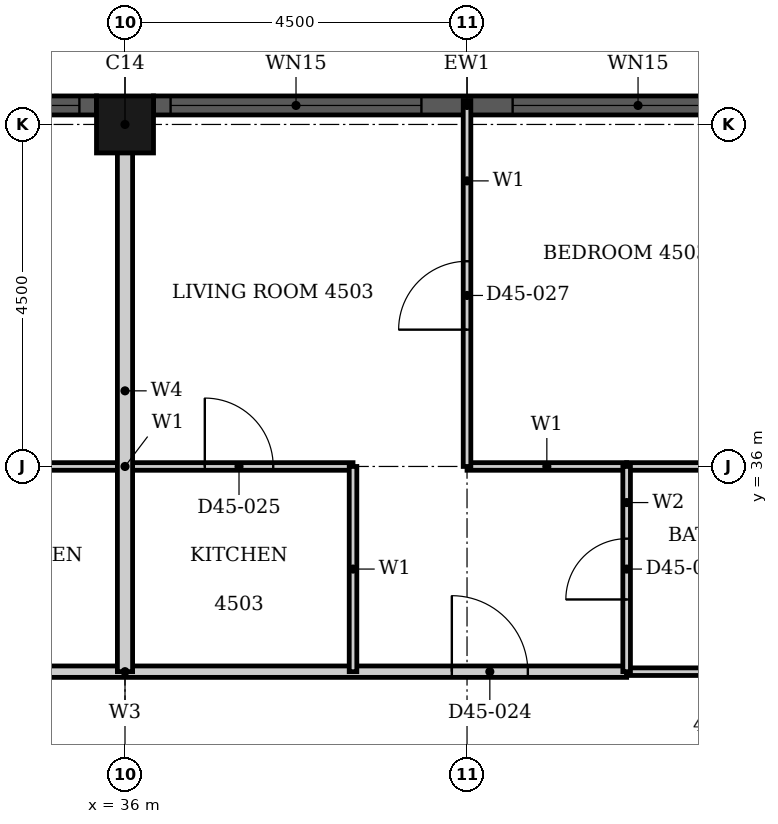
"""IFC4 building model, lengths in metres.
Left out: names, types, materials, properties, quantities, classifications, styles, units other than length and angle.
Written with IfcOpenShell. Run it as: python <this file> out.ifc"""

import sys

from ifc_helpers import new_model, si_unit, direction, frame, frame_2d, origin, origin_2d, place, context, subcontext, project, spatial, rectangle, hollow_rectangle, extrude, element, fill, save


model = new_model("IFC4")
c1 = context("Model", 3, precision=1e-05, world=origin(), true_north=direction((0.0, 1.0)))
c2 = subcontext(c1, "Body", "Model", "MODEL_VIEW")
j1 = project(units=[si_unit("LENGTHUNIT", "METRE"), si_unit("PLANEANGLEUNIT", "RADIAN")], contexts=[c1])
p1 = place(None, origin())
s1 = spatial("IfcSite", under=j1, at=p1, CompositionType="ELEMENT")
p2 = place(p1, origin())
s2 = spatial("IfcBuilding", under=s1, at=p2, CompositionType="ELEMENT")
p3 = place(p2, frame((0.0, 0.0, 180.2)))
s3 = spatial("IfcBuildingStorey", under=s2, at=p3, CompositionType="ELEMENT", Elevation=180.2)
p4 = place(p3, frame((36.0, 40.5, 0.0), z_axis=(0.0, 0.0, 1.0), x_axis=(1.0, 0.0, 0.0)))
e1 = element("IfcColumn", 1, at=p4, inside=s3, PredefinedType="COLUMN", context=c2, shape_type="SweptSolid", body=[
    extrude(hollow_rectangle(XDim=0.75, YDim=0.75, WallThickness=0.024, at=origin_2d()), origin(), (0.0, 0.0, 1.0), 3.7),
])
p5 = place(p3, frame((44.625, 40.75, 0.0), z_axis=(0.0, 0.0, 1.0), x_axis=(-1.0, 0.0, 0.0)))
e2 = element("IfcWall", 2, at=p5, inside=s3, PredefinedType="SOLIDWALL", context=c2, shape_type="SweptSolid", body=[
    extrude(rectangle(XDim=8.25, YDim=0.25, at=frame_2d((4.125, 0.0))), origin(), (0.0, 0.0, 1.0), 3.7),
])
p6 = place(p5, frame((0.225, 0.0, 0.45)))
e3 = element("IfcOpeningElement", 3, at=p6, cuts=e2, PredefinedType="OPENING", context=c2, shape_type="SweptSolid", body=[
    extrude(rectangle(XDim=3.3, YDim=2.3, at=frame_2d((1.65, 1.15))), frame((0.0, 0.135, 0.0), z_axis=(0.0, -1.0, 0.0), x_axis=(1.0, 0.0, 0.0)), (0.0, 0.0, 1.0), 0.27),
])
p7 = place(p5, frame((4.725, 0.0, 0.45)))
e4 = element("IfcOpeningElement", 4, at=p7, cuts=e2, PredefinedType="OPENING", context=c2, shape_type="SweptSolid", body=[
    extrude(rectangle(XDim=3.3, YDim=2.3, at=frame_2d((1.65, 1.15))), frame((0.0, 0.135, 0.0), z_axis=(0.0, -1.0, 0.0), x_axis=(1.0, 0.0, 0.0)), (0.0, 0.0, 1.0), 0.27),
])
p8 = place(p3, frame((35.625, 40.75, 0.0), z_axis=(0.0, 0.0, 1.0), x_axis=(-1.0, 0.0, 0.0)))
e5 = element("IfcWall", 5, at=p8, inside=s3, PredefinedType="SOLIDWALL", context=c2, shape_type="SweptSolid", body=[
    extrude(rectangle(XDim=8.25, YDim=0.25, at=frame_2d((4.125, 0.0))), origin(), (0.0, 0.0, 1.0), 3.7),
])
p9 = place(p8, frame((0.225, 0.0, 0.45)))
e6 = element("IfcOpeningElement", 6, at=p9, cuts=e5, PredefinedType="OPENING", context=c2, shape_type="SweptSolid", body=[
    extrude(rectangle(XDim=3.3, YDim=2.3, at=frame_2d((1.65, 1.15))), frame((0.0, 0.135, 0.0), z_axis=(0.0, -1.0, 0.0), x_axis=(1.0, 0.0, 0.0)), (0.0, 0.0, 1.0), 0.27),
])
p10 = place(p8, frame((4.725, 0.0, 0.45)))
e7 = element("IfcOpeningElement", 7, at=p10, cuts=e5, PredefinedType="OPENING", context=c2, shape_type="SweptSolid", body=[
    extrude(rectangle(XDim=3.3, YDim=2.3, at=frame_2d((1.65, 1.15))), frame((0.0, 0.135, 0.0), z_axis=(0.0, -1.0, 0.0), x_axis=(1.0, 0.0, 0.0)), (0.0, 0.0, 1.0), 0.27),
])
p11 = place(p3, frame((29.4, 33.3, 0.0), z_axis=(0.0, 0.0, 1.0), x_axis=(1.0, 0.0, 0.0)))
e8 = element("IfcWall", 8, at=p11, inside=s3, PredefinedType="PARTITIONING", context=c2, shape_type="SweptSolid", body=[
    extrude(rectangle(XDim=13.2, YDim=0.15, at=frame_2d((6.6, 0.0))), origin(), (0.0, 0.0, 1.0), 3.4),
])
p12 = place(p11, frame((1.3, 0.0, 0.0)))
e9 = element("IfcOpeningElement", 9, at=p12, cuts=e8, PredefinedType="OPENING", context=c2, shape_type="SweptSolid", body=[
    extrude(rectangle(XDim=1.0, YDim=2.2, at=frame_2d((0.5, 1.1))), frame((0.0, 0.085, 0.0), z_axis=(0.0, -1.0, 0.0), x_axis=(1.0, 0.0, 0.0)), (0.0, 0.0, 1.0), 0.17),
])
p13 = place(p11, frame((10.9, 0.0, 0.0)))
e10 = element("IfcOpeningElement", 10, at=p13, cuts=e8, PredefinedType="OPENING", context=c2, shape_type="SweptSolid", body=[
    extrude(rectangle(XDim=1.0, YDim=2.2, at=frame_2d((0.5, 1.1))), frame((0.0, 0.085, 0.0), z_axis=(0.0, -1.0, 0.0), x_axis=(1.0, 0.0, 0.0)), (0.0, 0.0, 1.0), 0.17),
])
p14 = place(p3, frame((33.0, 36.0, 0.0), z_axis=(0.0, 0.0, 1.0), x_axis=(1.0, 0.0, 0.0)))
e11 = element("IfcWall", 11, at=p14, inside=s3, PredefinedType="PARTITIONING", context=c2, shape_type="SweptSolid", body=[
    extrude(rectangle(XDim=6.0, YDim=0.1, at=frame_2d((3.0, 0.0))), origin(), (0.0, 0.0, 1.0), 3.4),
])
p15 = place(p14, frame((1.05, 0.0, 0.0)))
e12 = element("IfcOpeningElement", 12, at=p15, cuts=e11, PredefinedType="OPENING", context=c2, shape_type="SweptSolid", body=[
    extrude(rectangle(XDim=0.9, YDim=2.1, at=frame_2d((0.45, 1.05))), frame((0.0, 0.06, 0.0), z_axis=(0.0, -1.0, 0.0), x_axis=(1.0, 0.0, 0.0)), (0.0, 0.0, 1.0), 0.12),
])
p16 = place(p14, frame((4.05, 0.0, 0.0)))
e13 = element("IfcOpeningElement", 13, at=p16, cuts=e11, PredefinedType="OPENING", context=c2, shape_type="SweptSolid", body=[
    extrude(rectangle(XDim=0.9, YDim=2.1, at=frame_2d((0.45, 1.05))), frame((0.0, 0.06, 0.0), z_axis=(0.0, -1.0, 0.0), x_axis=(1.0, 0.0, 0.0)), (0.0, 0.0, 1.0), 0.12),
])
p17 = place(p3, frame((40.5, 36.0, 0.0), z_axis=(0.0, 0.0, 1.0), x_axis=(1.0, 0.0, 0.0)))
e14 = element("IfcWall", 14, at=p17, inside=s3, PredefinedType="PARTITIONING", context=c2, shape_type="SweptSolid", body=[
    extrude(rectangle(XDim=2.1, YDim=0.1, at=frame_2d((1.05, 0.0))), origin(), (0.0, 0.0, 1.0), 3.4),
])
p18 = place(p3, frame((39.0, 33.3, 0.0), z_axis=(0.0, 0.0, 1.0), x_axis=(0.0, 1.0, 0.0)))
e15 = element("IfcWall", 15, at=p18, inside=s3, PredefinedType="PARTITIONING", context=c2, shape_type="SweptSolid", body=[
    extrude(rectangle(XDim=2.7, YDim=0.1, at=frame_2d((1.35, 0.0))), origin(), (0.0, 0.0, 1.0), 3.4),
])
p19 = place(p3, frame((40.5, 36.0, 0.0), z_axis=(0.0, 0.0, 1.0), x_axis=(0.0, 1.0, 0.0)))
e16 = element("IfcWall", 16, at=p19, inside=s3, PredefinedType="PARTITIONING", context=c2, shape_type="SweptSolid", body=[
    extrude(rectangle(XDim=4.815, YDim=0.1, at=frame_2d((2.407, 0.0))), origin(), (0.0, 0.0, 1.0), 3.4),
])
p20 = place(p19, frame((1.8, 0.0, 0.0)))
e17 = element("IfcOpeningElement", 17, at=p20, cuts=e16, PredefinedType="OPENING", context=c2, shape_type="SweptSolid", body=[
    extrude(rectangle(XDim=0.9, YDim=2.1, at=frame_2d((0.45, 1.05))), frame((0.0, 0.06, 0.0), z_axis=(0.0, -1.0, 0.0), x_axis=(1.0, 0.0, 0.0)), (0.0, 0.0, 1.0), 0.12),
])
p21 = place(p3, frame((36.0, 33.3, 0.0), z_axis=(0.0, 0.0, 1.0), x_axis=(0.0, 1.0, 0.0)))
e18 = element("IfcWall", 18, at=p21, inside=s3, PredefinedType="PARTITIONING", context=c2, shape_type="SweptSolid", body=[
    extrude(rectangle(XDim=7.39, YDim=0.2, at=frame_2d((3.695, 0.0))), origin(), (0.0, 0.0, 1.0), 3.4),
])
for number, where, z_axis, x_axis in (
    (19, (42.6, 33.3, 0.0), (0.0, 0.0, 1.0), (1.0, 0.0, 0.0)),
    (20, (42.6, 36.0, 0.0), (0.0, 0.0, 1.0), (1.0, 0.0, 0.0)),
):
    element("IfcWall", number, at=place(p3, frame(where, z_axis=z_axis, x_axis=x_axis)), inside=s3, PredefinedType="PARTITIONING", context=c2, shape_type="SweptSolid", body=[
        extrude(rectangle(XDim=2.4, YDim=0.1, at=frame_2d((1.2, 0.0))), origin(), (0.0, 0.0, 1.0), 3.4),
    ])
p22 = place(p3, frame((42.6, 33.3, 0.0), z_axis=(0.0, 0.0, 1.0), x_axis=(0.0, 1.0, 0.0)))
e21 = element("IfcWall", 21, at=p22, inside=s3, PredefinedType="PARTITIONING", context=c2, shape_type="SweptSolid", body=[
    extrude(rectangle(XDim=2.7, YDim=0.1, at=frame_2d((1.35, 0.0))), origin(), (0.0, 0.0, 1.0), 3.4),
])
p23 = place(p22, frame((0.95, 0.0, 0.0)))
e22 = element("IfcOpeningElement", 22, at=p23, cuts=e21, PredefinedType="OPENING", context=c2, shape_type="SweptSolid", body=[
    extrude(rectangle(XDim=0.8, YDim=2.1, at=frame_2d((0.4, 1.05))), frame((0.0, 0.06, 0.0), z_axis=(0.0, -1.0, 0.0), x_axis=(1.0, 0.0, 0.0)), (0.0, 0.0, 1.0), 0.12),
])
p24 = place(p6, origin())
e23 = element("IfcWindow", 23, at=p24, inside=s3, PartitioningType="SINGLE_PANEL", PredefinedType="WINDOW", context=c2, shape_type="SweptSolid", body=[
    extrude(rectangle(XDim=3.3, YDim=2.3, at=frame_2d((1.65, 1.15))), frame((0.0, 0.03, 0.0), z_axis=(0.0, -1.0, 0.0), x_axis=(1.0, 0.0, 0.0)), (0.0, 0.0, 1.0), 0.06),
])
fill(e3, e23)
p25 = place(p7, origin())
e24 = element("IfcWindow", 24, at=p25, inside=s3, PartitioningType="SINGLE_PANEL", PredefinedType="WINDOW", context=c2, shape_type="SweptSolid", body=[
    extrude(rectangle(XDim=3.3, YDim=2.3, at=frame_2d((1.65, 1.15))), frame((0.0, 0.03, 0.0), z_axis=(0.0, -1.0, 0.0), x_axis=(1.0, 0.0, 0.0)), (0.0, 0.0, 1.0), 0.06),
])
fill(e4, e24)
p26 = place(p9, origin())
e25 = element("IfcWindow", 25, at=p26, inside=s3, PartitioningType="SINGLE_PANEL", PredefinedType="WINDOW", context=c2, shape_type="SweptSolid", body=[
    extrude(rectangle(XDim=3.3, YDim=2.3, at=frame_2d((1.65, 1.15))), frame((0.0, 0.03, 0.0), z_axis=(0.0, -1.0, 0.0), x_axis=(1.0, 0.0, 0.0)), (0.0, 0.0, 1.0), 0.06),
])
fill(e6, e25)
p27 = place(p13, origin())
e26 = element("IfcDoor", 26, at=p27, inside=s3, OperationType="SINGLE_SWING_LEFT", PredefinedType="DOOR", context=c2, shape_type="SweptSolid", body=[
    extrude(rectangle(XDim=1.0, YDim=2.2, at=frame_2d((0.5, 1.1))), frame((0.0, 0.025, 0.0), z_axis=(0.0, -1.0, 0.0), x_axis=(1.0, 0.0, 0.0)), (0.0, 0.0, 1.0), 0.05),
])
fill(e10, e26)
p28 = place(p16, origin())
e27 = element("IfcDoor", 27, at=p28, inside=s3, OperationType="SINGLE_SWING_LEFT", PredefinedType="DOOR", context=c2, shape_type="SweptSolid", body=[
    extrude(rectangle(XDim=0.9, YDim=2.1, at=frame_2d((0.45, 1.05))), frame((0.0, 0.025, 0.0), z_axis=(0.0, -1.0, 0.0), x_axis=(1.0, 0.0, 0.0)), (0.0, 0.0, 1.0), 0.05),
])
fill(e13, e27)
p29 = place(p23, origin())
e28 = element("IfcDoor", 28, at=p29, inside=s3, OperationType="SINGLE_SWING_RIGHT", PredefinedType="DOOR", context=c2, shape_type="SweptSolid", body=[
    extrude(rectangle(XDim=0.8, YDim=2.1, at=frame_2d((0.4, 1.05))), frame((0.0, 0.025, 0.0), z_axis=(0.0, -1.0, 0.0), x_axis=(1.0, 0.0, 0.0)), (0.0, 0.0, 1.0), 0.05),
])
fill(e22, e28)
p30 = place(p20, origin())
e29 = element("IfcDoor", 29, at=p30, inside=s3, OperationType="SINGLE_SWING_LEFT", PredefinedType="DOOR", context=c2, shape_type="SweptSolid", body=[
    extrude(rectangle(XDim=0.9, YDim=2.1, at=frame_2d((0.45, 1.05))), frame((0.0, 0.025, 0.0), z_axis=(0.0, -1.0, 0.0), x_axis=(1.0, 0.0, 0.0)), (0.0, 0.0, 1.0), 0.05),
])
fill(e17, e29)
save(model, sys.argv[1])
